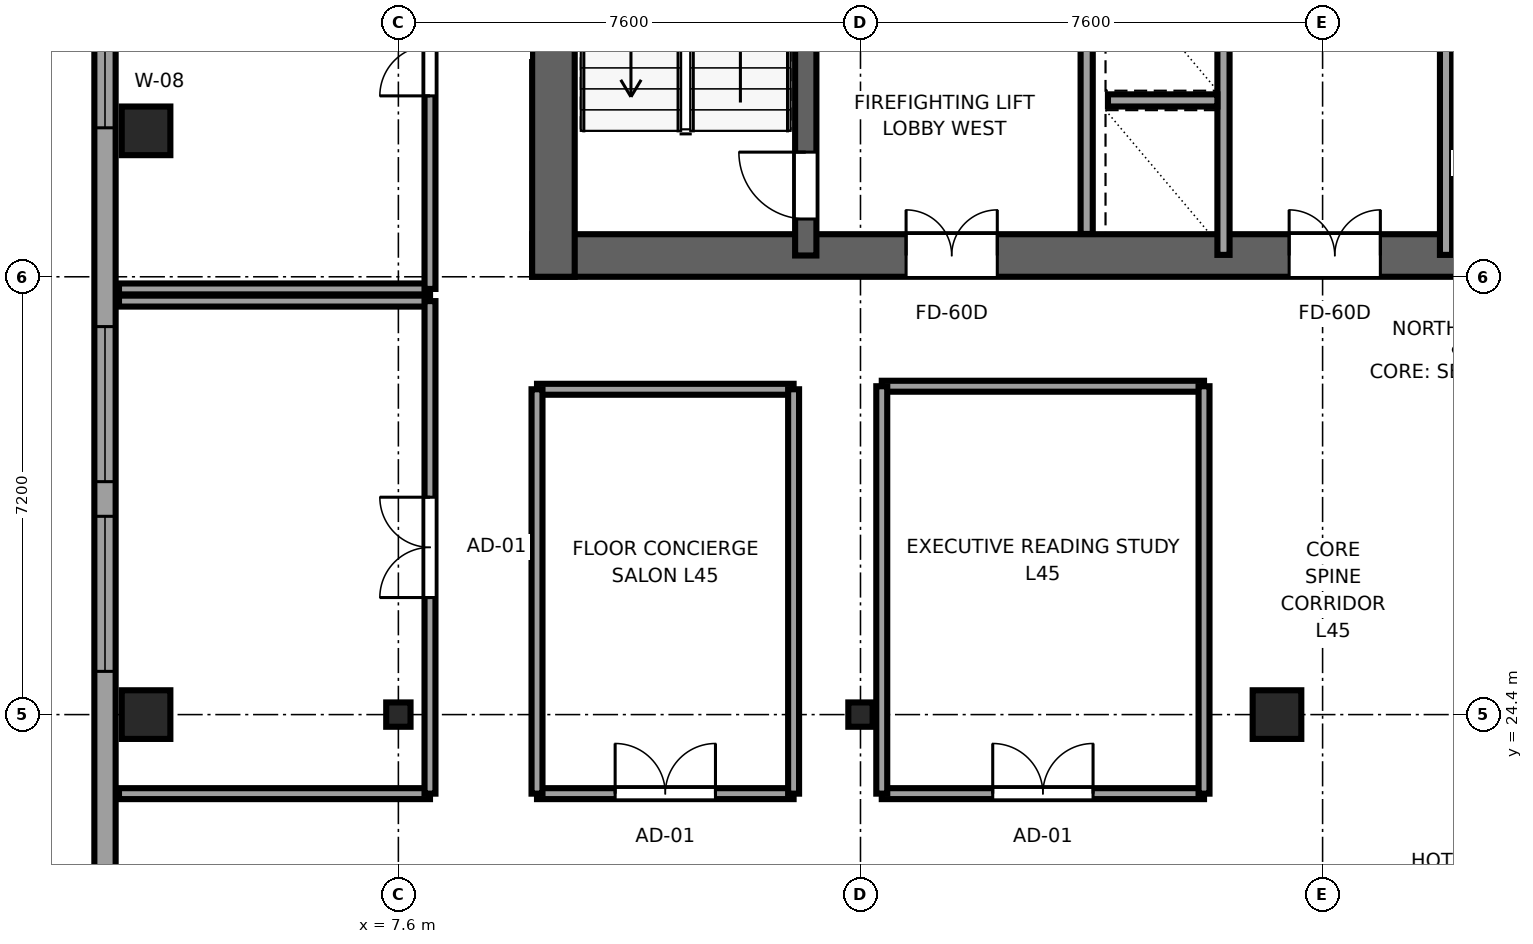
"""IFC4 building model, lengths in metres.
Left out: names, types, materials, properties, quantities, classifications, styles, units other than length and angle.
Written with IfcOpenShell. Run it as: python <this file> out.ifc"""

import sys

from ifc_helpers import new_model, si_unit, direction, frame, frame_2d, origin, origin_2d, place, context, subcontext, project, spatial, rectangle, i_section, extrude, source, transform, mapped, element, fill, save


model = new_model("IFC4")
c1 = context("Model", 3, precision=1e-05, world=origin(), true_north=direction((0.0, 1.0)))
c2 = subcontext(c1, "Body", "Model", "MODEL_VIEW")
j1 = project(units=[si_unit("LENGTHUNIT", "METRE"), si_unit("PLANEANGLEUNIT", "RADIAN")], contexts=[c1])
p1 = place(None, origin())
s1 = spatial("IfcSite", under=j1, at=p1, CompositionType="ELEMENT")
p2 = place(p1, origin())
s2 = spatial("IfcBuilding", under=s1, at=p2, CompositionType="ELEMENT")
p3 = place(p2, frame((0.0, 0.0, 171.9)))
s3 = spatial("IfcBuildingStorey", under=s2, at=p3, CompositionType="ELEMENT", Elevation=171.9)
p4 = place(p3, frame((9.8, 31.95, 0.0), z_axis=(0.0, 0.0, 1.0), x_axis=(1.0, 0.0, 0.0)))
e1 = element("IfcWall", 1, at=p4, inside=s3, PredefinedType="SHEAR", context=c2, shape_type="SweptSolid", body=[
    extrude(rectangle(XDim=26.4, YDim=0.7, at=frame_2d((13.2, 0.0))), origin(), (0.0, 0.0, 1.0), 3.55),
])
p5 = place(p4, frame((7.65, 0.0, 0.0), z_axis=(0.0, 0.0, 1.0), x_axis=(-1.0, 0.0, 0.0)))
e2 = element("IfcOpeningElement", 2, at=p5, cuts=e1, PredefinedType="OPENING", context=c2, shape_type="SweptSolid", body=[
    extrude(rectangle(XDim=1.5, YDim=2.04, at=frame_2d((0.75, 1.02))), frame((0.0, 0.36, 0.0), z_axis=(0.0, -1.0, 0.0), x_axis=(1.0, 0.0, 0.0)), (0.0, 0.0, 1.0), 0.72),
])
p6 = place(p4, frame((13.95, 0.0, 0.0), z_axis=(0.0, 0.0, 1.0), x_axis=(-1.0, 0.0, 0.0)))
e3 = element("IfcOpeningElement", 3, at=p6, cuts=e1, PredefinedType="OPENING", context=c2, shape_type="SweptSolid", body=[
    extrude(rectangle(XDim=1.5, YDim=2.04, at=frame_2d((0.75, 1.02))), frame((0.0, 0.36, 0.0), z_axis=(0.0, -1.0, 0.0), x_axis=(1.0, 0.0, 0.0)), (0.0, 0.0, 1.0), 0.72),
])
p7 = place(p4, frame((20.25, 0.0, 0.0), z_axis=(0.0, 0.0, 1.0), x_axis=(-1.0, 0.0, 0.0)))
e4 = element("IfcOpeningElement", 4, at=p7, cuts=e1, PredefinedType="OPENING", context=c2, shape_type="SweptSolid", body=[
    extrude(rectangle(XDim=1.5, YDim=2.04, at=frame_2d((0.75, 1.02))), frame((0.0, 0.36, 0.0), z_axis=(0.0, -1.0, 0.0), x_axis=(1.0, 0.0, 0.0)), (0.0, 0.0, 1.0), 0.72),
])
p8 = place(p3, frame((10.15, 31.6, 0.0), z_axis=(0.0, 0.0, 1.0), x_axis=(0.0, 1.0, 0.0)))
e5 = element("IfcWall", 5, at=p8, inside=s3, PredefinedType="SHEAR", context=c2, shape_type="SweptSolid", body=[
    extrude(rectangle(XDim=13.6, YDim=0.7, at=frame_2d((6.8, 0.0))), origin(), (0.0, 0.0, 1.0), 3.55),
])
p9 = place(p3, frame((14.3, 31.95, 0.0), z_axis=(0.0, 0.0, 1.0), x_axis=(0.0, 1.0, 0.0)))
e6 = element("IfcWall", 6, at=p9, inside=s3, PredefinedType="SHEAR", context=c2, shape_type="SweptSolid", body=[
    extrude(rectangle(XDim=12.9, YDim=0.35, at=frame_2d((6.45, 0.0))), origin(), (0.0, 0.0, 1.0), 3.55),
])
p10 = place(p9, frame((0.6, 0.0, 0.0)))
e7 = element("IfcOpeningElement", 7, at=p10, cuts=e6, PredefinedType="OPENING", context=c2, shape_type="SweptSolid", body=[
    extrude(rectangle(XDim=1.1, YDim=2.12, at=frame_2d((0.55, 1.06))), frame((0.0, 0.185, 0.0), z_axis=(0.0, -1.0, 0.0), x_axis=(1.0, 0.0, 0.0)), (0.0, 0.0, 1.0), 0.37),
])
m1 = source(origin(), c2, "Body", "SweptSolid", [
    extrude(rectangle(XDim=0.8, YDim=0.8, at=origin_2d()), origin(), (0.0, 0.0, 1.0), 3.55),
])
p11 = place(p3, frame((3.45, 24.4, 0.0), z_axis=(0.0, 0.0, 1.0), x_axis=(1.0, 0.0, 0.0)))
e8 = element("IfcColumn", 8, at=p11, inside=s3, PredefinedType="COLUMN", context=c2, shape_type="MappedRepresentation", body=[
    mapped(m1, transform((0.0, 0.0, 0.0), x_axis=(1.0, 0.0, 0.0), y_axis=(0.0, 1.0, 0.0), z_axis=(0.0, 0.0, 1.0), scale=1.0)),
])
m2 = source(origin(), c2, "Body", "SweptSolid", [
    extrude(i_section(OverallWidth=0.4, OverallDepth=0.4, WebThickness=0.02, FlangeThickness=0.035, at=origin_2d()), origin(), (0.0, 0.0, 1.0), 3.55),
])
for number, where, z_axis, x_axis in (
    (9, (7.6, 24.4, 0.0), (0.0, 0.0, 1.0), (1.0, 0.0, 0.0)),
    (10, (15.2, 24.4, 0.0), (0.0, 0.0, 1.0), (1.0, 0.0, 0.0)),
):
    element("IfcColumn", number, at=place(p3, frame(where, z_axis=z_axis, x_axis=x_axis)), inside=s3, PredefinedType="COLUMN", context=c2, shape_type="MappedRepresentation", body=[
        mapped(m2, transform((0.0, 0.0, 0.0), x_axis=(1.0, 0.0, 0.0), y_axis=(0.0, 1.0, 0.0), z_axis=(0.0, 0.0, 1.0), scale=1.0)),
    ])
for number, where, z_axis, x_axis in (
    (11, (22.05, 24.4, 0.0), (0.0, 0.0, 1.0), (1.0, 0.0, 0.0)),
    (12, (3.45, 34.0, 0.0), (0.0, 0.0, 1.0), (1.0, 0.0, 0.0)),
):
    element("IfcColumn", number, at=place(p3, frame(where, z_axis=z_axis, x_axis=x_axis)), inside=s3, PredefinedType="COLUMN", context=c2, shape_type="MappedRepresentation", body=[
        mapped(m1, transform((0.0, 0.0, 0.0), x_axis=(1.0, 0.0, 0.0), y_axis=(0.0, 1.0, 0.0), z_axis=(0.0, 0.0, 1.0), scale=1.0)),
    ])
p12 = place(p3, frame((2.775, 41.583, 0.0), z_axis=(0.0, 0.0, 1.0), x_axis=(0.0, -1.0, 0.0)))
e13 = element("IfcWall", 13, at=p12, inside=s3, PredefinedType="SOLIDWALL", context=c2, shape_type="SweptSolid", body=[
    extrude(rectangle(XDim=34.566, YDim=0.35, at=frame_2d((17.283, 0.0))), origin(), (0.0, 0.0, 1.0), 3.37),
])
p13 = place(p12, frame((10.802, 0.0, 0.68)))
e14 = element("IfcOpeningElement", 14, at=p13, cuts=e13, PredefinedType="OPENING", context=c2, shape_type="SweptSolid", body=[
    extrude(rectangle(XDim=2.55, YDim=1.92, at=frame_2d((1.275, 0.96))), frame((0.0, 0.185, 0.0), z_axis=(0.0, -1.0, 0.0), x_axis=(1.0, 0.0, 0.0)), (0.0, 0.0, 1.0), 0.37),
])
p14 = place(p12, frame((13.922, 0.0, 0.68)))
e15 = element("IfcOpeningElement", 15, at=p14, cuts=e13, PredefinedType="OPENING", context=c2, shape_type="SweptSolid", body=[
    extrude(rectangle(XDim=2.55, YDim=1.92, at=frame_2d((1.275, 0.96))), frame((0.0, 0.185, 0.0), z_axis=(0.0, -1.0, 0.0), x_axis=(1.0, 0.0, 0.0)), (0.0, 0.0, 1.0), 0.37),
])
p15 = place(p12, frame((22.264, 0.0, 0.68)))
e16 = element("IfcOpeningElement", 16, at=p15, cuts=e13, PredefinedType="OPENING", context=c2, shape_type="SweptSolid", body=[
    extrude(rectangle(XDim=2.55, YDim=1.92, at=frame_2d((1.275, 0.96))), frame((0.0, 0.185, 0.0), z_axis=(0.0, -1.0, 0.0), x_axis=(1.0, 0.0, 0.0)), (0.0, 0.0, 1.0), 0.37),
])
p16 = place(p12, frame((26.985, 0.0, 0.68)))
e17 = element("IfcOpeningElement", 17, at=p16, cuts=e13, PredefinedType="OPENING", context=c2, shape_type="SweptSolid", body=[
    extrude(rectangle(XDim=2.55, YDim=1.92, at=frame_2d((1.275, 0.96))), frame((0.0, 0.185, 0.0), z_axis=(0.0, -1.0, 0.0), x_axis=(1.0, 0.0, 0.0)), (0.0, 0.0, 1.0), 0.37),
])
p17 = place(p12, frame((6.033, 0.0, 0.62)))
e18 = element("IfcOpeningElement", 18, at=p17, cuts=e13, PredefinedType="OPENING", context=c2, shape_type="SweptSolid", body=[
    extrude(rectangle(XDim=1.5, YDim=1.55, at=frame_2d((0.75, 0.775))), frame((0.0, 0.185, 0.0), z_axis=(0.0, -1.0, 0.0), x_axis=(1.0, 0.0, 0.0)), (0.0, 0.0, 1.0), 0.37),
])
p18 = place(p3, frame((18.92, 32.304, 0.0), z_axis=(0.0, 0.0, 1.0), x_axis=(0.0, 1.0, 0.0)))
e19 = element("IfcWall", 19, at=p18, inside=s3, PredefinedType="SOLIDWALL", context=c2, shape_type="SweptSolid", body=[
    extrude(rectangle(XDim=3.846, YDim=0.2, at=frame_2d((1.923, 0.0))), origin(), (0.0, 0.0, 1.0), 3.37),
])
p19 = place(p3, frame((21.17, 31.96, 0.0), z_axis=(0.0, 0.0, 1.0), x_axis=(0.0, 1.0, 0.0)))
e20 = element("IfcWall", 20, at=p19, inside=s3, PredefinedType="SOLIDWALL", context=c2, shape_type="SweptSolid", body=[
    extrude(rectangle(XDim=12.58, YDim=0.2, at=frame_2d((6.29, 0.0))), origin(), (0.0, 0.0, 1.0), 3.37),
])
p20 = place(p19, frame((5.74, 0.0, 0.0)))
e21 = element("IfcOpeningElement", 21, at=p20, cuts=e20, PredefinedType="OPENING", context=c2, shape_type="SweptSolid", body=[
    extrude(rectangle(XDim=1.1, YDim=2.12, at=frame_2d((0.55, 1.06))), frame((0.0, 0.11, 0.0), z_axis=(0.0, -1.0, 0.0), x_axis=(1.0, 0.0, 0.0)), (0.0, 0.0, 1.0), 0.22),
])
p21 = place(p19, frame((8.24, 0.0, 0.0)))
e22 = element("IfcOpeningElement", 22, at=p21, cuts=e20, PredefinedType="OPENING", context=c2, shape_type="SweptSolid", body=[
    extrude(rectangle(XDim=1.1, YDim=2.12, at=frame_2d((0.55, 1.06))), frame((0.0, 0.11, 0.0), z_axis=(0.0, -1.0, 0.0), x_axis=(1.0, 0.0, 0.0)), (0.0, 0.0, 1.0), 0.22),
])
p22 = place(p3, frame((19.27, 34.5, 0.0), z_axis=(0.0, 0.0, 1.0), x_axis=(1.0, 0.0, 0.0)))
e23 = element("IfcWall", 23, at=p22, inside=s3, PredefinedType="SOLIDWALL", context=c2, shape_type="SweptSolid", body=[
    extrude(rectangle(XDim=1.8, YDim=0.2, at=frame_2d((0.9, 0.0))), origin(), (0.0, 0.0, 1.0), 3.37),
])
p23 = place(p3, frame((24.83, 31.96, 0.0), z_axis=(0.0, 0.0, 1.0), x_axis=(0.0, 1.0, 0.0)))
e24 = element("IfcWall", 24, at=p23, inside=s3, PredefinedType="SOLIDWALL", context=c2, shape_type="SweptSolid", body=[
    extrude(rectangle(XDim=12.58, YDim=0.2, at=frame_2d((6.29, 0.0))), origin(), (0.0, 0.0, 1.0), 3.37),
])
p24 = place(p23, frame((5.74, 0.0, 0.0)))
e25 = element("IfcOpeningElement", 25, at=p24, cuts=e24, PredefinedType="OPENING", context=c2, shape_type="SweptSolid", body=[
    extrude(rectangle(XDim=1.1, YDim=2.12, at=frame_2d((0.55, 1.06))), frame((0.0, 0.11, 0.0), z_axis=(0.0, -1.0, 0.0), x_axis=(1.0, 0.0, 0.0)), (0.0, 0.0, 1.0), 0.22),
])
p25 = place(p23, frame((8.24, 0.0, 0.0)))
e26 = element("IfcOpeningElement", 26, at=p25, cuts=e24, PredefinedType="OPENING", context=c2, shape_type="SweptSolid", body=[
    extrude(rectangle(XDim=1.1, YDim=2.12, at=frame_2d((0.55, 1.06))), frame((0.0, 0.11, 0.0), z_axis=(0.0, -1.0, 0.0), x_axis=(1.0, 0.0, 0.0)), (0.0, 0.0, 1.0), 0.22),
])
p26 = place(p3, frame((24.93, 34.5, 0.0), z_axis=(0.0, 0.0, 1.0), x_axis=(1.0, 0.0, 0.0)))
e27 = element("IfcWall", 27, at=p26, inside=s3, PredefinedType="SOLIDWALL", context=c2, shape_type="SweptSolid", body=[
    extrude(rectangle(XDim=1.8, YDim=0.2, at=frame_2d((0.9, 0.0))), origin(), (0.0, 0.0, 1.0), 3.37),
])
for number, where, z_axis, x_axis in (
    (28, (3.005, 23.1, 0.0), (0.0, 0.0, 1.0), (1.0, 0.0, 0.0)),
    (29, (3.005, 31.2, 0.0), (0.0, 0.0, 1.0), (1.0, 0.0, 0.0)),
):
    element("IfcWall", number, at=place(p3, frame(where, z_axis=z_axis, x_axis=x_axis)), inside=s3, PredefinedType="PARTITIONING", context=c2, shape_type="SweptSolid", body=[
        extrude(rectangle(XDim=5.115, YDim=0.18, at=frame_2d((2.558, 0.0))), origin(), (0.0, 0.0, 1.0), 3.37),
    ])
p27 = place(p3, frame((8.12, 23.1, 0.0), z_axis=(0.0, 0.0, 1.0), x_axis=(0.0, 1.0, 0.0)))
e30 = element("IfcWall", 30, at=p27, inside=s3, PredefinedType="PARTITIONING", context=c2, shape_type="SweptSolid", body=[
    extrude(rectangle(XDim=8.1, YDim=0.18, at=frame_2d((4.05, 0.0))), origin(), (0.0, 0.0, 1.0), 3.37),
])
p28 = place(p27, frame((3.225, 0.0, 0.0)))
e31 = element("IfcOpeningElement", 31, at=p28, cuts=e30, PredefinedType="OPENING", context=c2, shape_type="SweptSolid", body=[
    extrude(rectangle(XDim=1.65, YDim=2.15, at=frame_2d((0.825, 1.075))), frame((0.0, 0.1, 0.0), z_axis=(0.0, -1.0, 0.0), x_axis=(1.0, 0.0, 0.0)), (0.0, 0.0, 1.0), 0.2),
])
p29 = place(p3, frame((3.005, 31.4, 0.0), z_axis=(0.0, 0.0, 1.0), x_axis=(1.0, 0.0, 0.0)))
e32 = element("IfcWall", 32, at=p29, inside=s3, PredefinedType="PARTITIONING", context=c2, shape_type="SweptSolid", body=[
    extrude(rectangle(XDim=5.115, YDim=0.18, at=frame_2d((2.558, 0.0))), origin(), (0.0, 0.0, 1.0), 3.37),
])
p30 = place(p3, frame((8.12, 31.4, 0.0), z_axis=(0.0, 0.0, 1.0), x_axis=(0.0, 1.0, 0.0)))
e33 = element("IfcWall", 33, at=p30, inside=s3, PredefinedType="PARTITIONING", context=c2, shape_type="SweptSolid", body=[
    extrude(rectangle(XDim=6.8, YDim=0.18, at=frame_2d((3.4, 0.0))), origin(), (0.0, 0.0, 1.0), 3.37),
])
p31 = place(p30, frame((3.175, 0.0, 0.0)))
e34 = element("IfcOpeningElement", 34, at=p31, cuts=e33, PredefinedType="OPENING", context=c2, shape_type="SweptSolid", body=[
    extrude(rectangle(XDim=1.65, YDim=2.15, at=frame_2d((0.825, 1.075))), frame((0.0, 0.1, 0.0), z_axis=(0.0, -1.0, 0.0), x_axis=(1.0, 0.0, 0.0)), (0.0, 0.0, 1.0), 0.2),
])
p32 = place(p3, frame((9.88, 23.1, 0.0), z_axis=(0.0, 0.0, 1.0), x_axis=(1.0, 0.0, 0.0)))
e35 = element("IfcWall", 35, at=p32, inside=s3, PredefinedType="PARTITIONING", context=c2, shape_type="SweptSolid", body=[
    extrude(rectangle(XDim=4.22, YDim=0.18, at=frame_2d((2.11, 0.0))), origin(), (0.0, 0.0, 1.0), 3.37),
])
p33 = place(p32, frame((1.285, 0.0, 0.0)))
e36 = element("IfcOpeningElement", 36, at=p33, cuts=e35, PredefinedType="OPENING", context=c2, shape_type="SweptSolid", body=[
    extrude(rectangle(XDim=1.65, YDim=2.15, at=frame_2d((0.825, 1.075))), frame((0.0, 0.1, 0.0), z_axis=(0.0, -1.0, 0.0), x_axis=(1.0, 0.0, 0.0)), (0.0, 0.0, 1.0), 0.2),
])
p34 = place(p3, frame((9.88, 29.75, 0.0), z_axis=(0.0, 0.0, 1.0), x_axis=(1.0, 0.0, 0.0)))
e37 = element("IfcWall", 37, at=p34, inside=s3, PredefinedType="PARTITIONING", context=c2, shape_type="SweptSolid", body=[
    extrude(rectangle(XDim=4.22, YDim=0.18, at=frame_2d((2.11, 0.0))), origin(), (0.0, 0.0, 1.0), 3.37),
])
for number, where, z_axis, x_axis in (
    (38, (9.88, 23.1, 0.0), (0.0, 0.0, 1.0), (0.0, 1.0, 0.0)),
    (39, (14.1, 23.1, 0.0), (0.0, 0.0, 1.0), (0.0, 1.0, 0.0)),
):
    element("IfcWall", number, at=place(p3, frame(where, z_axis=z_axis, x_axis=x_axis)), inside=s3, PredefinedType="PARTITIONING", context=c2, shape_type="SweptSolid", body=[
        extrude(rectangle(XDim=6.65, YDim=0.18, at=frame_2d((3.325, 0.0))), origin(), (0.0, 0.0, 1.0), 3.37),
    ])
p35 = place(p3, frame((15.55, 23.1, 0.0), z_axis=(0.0, 0.0, 1.0), x_axis=(1.0, 0.0, 0.0)))
e40 = element("IfcWall", 40, at=p35, inside=s3, PredefinedType="PARTITIONING", context=c2, shape_type="SweptSolid", body=[
    extrude(rectangle(XDim=5.3, YDim=0.18, at=frame_2d((2.65, 0.0))), origin(), (0.0, 0.0, 1.0), 3.37),
])
p36 = place(p35, frame((1.825, 0.0, 0.0)))
e41 = element("IfcOpeningElement", 41, at=p36, cuts=e40, PredefinedType="OPENING", context=c2, shape_type="SweptSolid", body=[
    extrude(rectangle(XDim=1.65, YDim=2.15, at=frame_2d((0.825, 1.075))), frame((0.0, 0.1, 0.0), z_axis=(0.0, -1.0, 0.0), x_axis=(1.0, 0.0, 0.0)), (0.0, 0.0, 1.0), 0.2),
])
p37 = place(p3, frame((15.55, 29.8, 0.0), z_axis=(0.0, 0.0, 1.0), x_axis=(1.0, 0.0, 0.0)))
e42 = element("IfcWall", 42, at=p37, inside=s3, PredefinedType="PARTITIONING", context=c2, shape_type="SweptSolid", body=[
    extrude(rectangle(XDim=5.3, YDim=0.18, at=frame_2d((2.65, 0.0))), origin(), (0.0, 0.0, 1.0), 3.37),
])
for number, where, z_axis, x_axis in (
    (43, (15.55, 23.1, 0.0), (0.0, 0.0, 1.0), (0.0, 1.0, 0.0)),
    (44, (20.85, 23.1, 0.0), (0.0, 0.0, 1.0), (0.0, 1.0, 0.0)),
):
    element("IfcWall", number, at=place(p3, frame(where, z_axis=z_axis, x_axis=x_axis)), inside=s3, PredefinedType="PARTITIONING", context=c2, shape_type="SweptSolid", body=[
        extrude(rectangle(XDim=6.7, YDim=0.18, at=frame_2d((3.35, 0.0))), origin(), (0.0, 0.0, 1.0), 3.37),
    ])
m3 = source(origin(), c2, "Body", "SweptSolid", [
    extrude(rectangle(XDim=2.55, YDim=1.92, at=frame_2d((1.275, 0.96))), frame((0.0, 0.09, 0.0), z_axis=(0.0, -1.0, 0.0), x_axis=(1.0, 0.0, 0.0)), (0.0, 0.0, 1.0), 0.06),
])
p38 = place(p13, origin())
e45 = element("IfcWindow", 45, at=p38, inside=s3, PartitioningType="TRIPLE_PANEL_HORIZONTAL", PredefinedType="WINDOW", context=c2, shape_type="MappedRepresentation", body=[
    mapped(m3, transform((0.0, 0.0, 0.0), x_axis=(1.0, 0.0, 0.0), y_axis=(0.0, 1.0, 0.0), z_axis=(0.0, 0.0, 1.0), scale=1.0)),
])
fill(e14, e45)
p39 = place(p14, origin())
e46 = element("IfcWindow", 46, at=p39, inside=s3, PartitioningType="TRIPLE_PANEL_HORIZONTAL", PredefinedType="WINDOW", context=c2, shape_type="MappedRepresentation", body=[
    mapped(m3, transform((0.0, 0.0, 0.0), x_axis=(1.0, 0.0, 0.0), y_axis=(0.0, 1.0, 0.0), z_axis=(0.0, 0.0, 1.0), scale=1.0)),
])
fill(e15, e46)
m4 = source(origin(), c2, "Body", "SweptSolid", [
    extrude(rectangle(XDim=1.5, YDim=1.55, at=frame_2d((0.75, 0.775))), frame((0.0, 0.09, 0.0), z_axis=(0.0, -1.0, 0.0), x_axis=(1.0, 0.0, 0.0)), (0.0, 0.0, 1.0), 0.06),
])
p40 = place(p17, origin())
e47 = element("IfcWindow", 47, at=p40, inside=s3, PartitioningType="SINGLE_PANEL", PredefinedType="WINDOW", context=c2, shape_type="MappedRepresentation", body=[
    mapped(m4, transform((0.0, 0.0, 0.0), x_axis=(1.0, 0.0, 0.0), y_axis=(0.0, 1.0, 0.0), z_axis=(0.0, 0.0, 1.0), scale=1.0)),
])
fill(e18, e47)
m5 = source(origin(), c2, "Body", "SweptSolid", [
    extrude(rectangle(XDim=1.1, YDim=2.12, at=frame_2d((0.55, 1.06))), frame((0.0, 0.025, 0.0), z_axis=(0.0, -1.0, 0.0), x_axis=(1.0, 0.0, 0.0)), (0.0, 0.0, 1.0), 0.05),
])
p41 = place(p10, origin())
e48 = element("IfcDoor", 48, at=p41, inside=s3, OperationType="SINGLE_SWING_RIGHT", PredefinedType="DOOR", context=c2, shape_type="MappedRepresentation", body=[
    mapped(m5, transform((0.0, 0.0, 0.0), x_axis=(1.0, 0.0, 0.0), y_axis=(0.0, 1.0, 0.0), z_axis=(0.0, 0.0, 1.0), scale=1.0)),
])
fill(e7, e48)
m6 = source(origin(), c2, "Body", "SweptSolid", [
    extrude(rectangle(XDim=1.5, YDim=2.04, at=frame_2d((0.75, 1.02))), frame((0.0, 0.025, 0.0), z_axis=(0.0, -1.0, 0.0), x_axis=(1.0, 0.0, 0.0)), (0.0, 0.0, 1.0), 0.05),
])
p42 = place(p5, origin())
e49 = element("IfcDoor", 49, at=p42, inside=s3, OperationType="DOUBLE_DOOR_SINGLE_SWING", PredefinedType="DOOR", context=c2, shape_type="MappedRepresentation", body=[
    mapped(m6, transform((0.0, 0.0, 0.0), x_axis=(1.0, 0.0, 0.0), y_axis=(0.0, 1.0, 0.0), z_axis=(0.0, 0.0, 1.0), scale=1.0)),
])
fill(e2, e49)
p43 = place(p6, origin())
e50 = element("IfcDoor", 50, at=p43, inside=s3, OperationType="DOUBLE_DOOR_SINGLE_SWING", PredefinedType="DOOR", context=c2, shape_type="MappedRepresentation", body=[
    mapped(m6, transform((0.0, 0.0, 0.0), x_axis=(1.0, 0.0, 0.0), y_axis=(0.0, 1.0, 0.0), z_axis=(0.0, 0.0, 1.0), scale=1.0)),
])
fill(e3, e50)
m7 = source(origin(), c2, "Body", "SweptSolid", [
    extrude(rectangle(XDim=1.65, YDim=2.15, at=frame_2d((0.825, 1.075))), frame((0.0, 0.025, 0.0), z_axis=(0.0, -1.0, 0.0), x_axis=(1.0, 0.0, 0.0)), (0.0, 0.0, 1.0), 0.05),
])
p44 = place(p28, origin())
e51 = element("IfcDoor", 51, at=p44, inside=s3, OperationType="DOUBLE_DOOR_SINGLE_SWING", PredefinedType="DOOR", context=c2, shape_type="MappedRepresentation", body=[
    mapped(m7, transform((0.0, 0.0, 0.0), x_axis=(1.0, 0.0, 0.0), y_axis=(0.0, 1.0, 0.0), z_axis=(0.0, 0.0, 1.0), scale=1.0)),
])
fill(e31, e51)
p45 = place(p31, origin())
e52 = element("IfcDoor", 52, at=p45, inside=s3, OperationType="DOUBLE_DOOR_SINGLE_SWING", PredefinedType="DOOR", context=c2, shape_type="MappedRepresentation", body=[
    mapped(m7, transform((0.0, 0.0, 0.0), x_axis=(1.0, 0.0, 0.0), y_axis=(0.0, 1.0, 0.0), z_axis=(0.0, 0.0, 1.0), scale=1.0)),
])
fill(e34, e52)
p46 = place(p33, origin())
e53 = element("IfcDoor", 53, at=p46, inside=s3, OperationType="DOUBLE_DOOR_SINGLE_SWING", PredefinedType="DOOR", context=c2, shape_type="MappedRepresentation", body=[
    mapped(m7, transform((0.0, 0.0, 0.0), x_axis=(1.0, 0.0, 0.0), y_axis=(0.0, 1.0, 0.0), z_axis=(0.0, 0.0, 1.0), scale=1.0)),
])
fill(e36, e53)
p47 = place(p36, origin())
e54 = element("IfcDoor", 54, at=p47, inside=s3, OperationType="DOUBLE_DOOR_SINGLE_SWING", PredefinedType="DOOR", context=c2, shape_type="MappedRepresentation", body=[
    mapped(m7, transform((0.0, 0.0, 0.0), x_axis=(1.0, 0.0, 0.0), y_axis=(0.0, 1.0, 0.0), z_axis=(0.0, 0.0, 1.0), scale=1.0)),
])
fill(e41, e54)
save(model, sys.argv[1])
